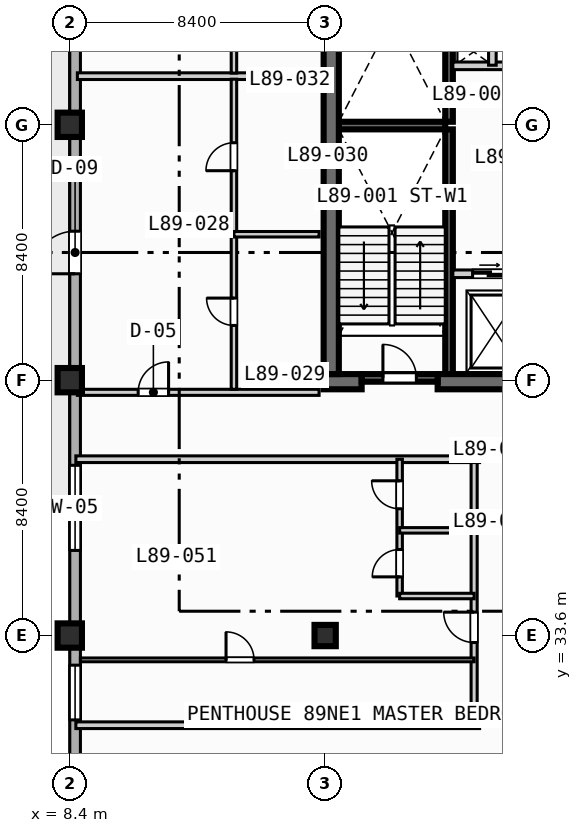
"""IFC4 building model, lengths in metres.
Left out: names, types, materials, properties, quantities, classifications, styles, units other than length and angle.
Written with IfcOpenShell. Run it as: python <this file> out.ifc"""

import sys

from ifc_helpers import new_model, si_unit, direction, frame, frame_2d, origin, origin_2d, place, context, subcontext, project, spatial, rectangle, extrude, element, fill, save


model = new_model("IFC4")
c1 = context("Model", 3, precision=1e-05, world=origin(), true_north=direction((0.0, 1.0)))
c2 = subcontext(c1, "Body", "Model", "MODEL_VIEW")
j1 = project(units=[si_unit("LENGTHUNIT", "METRE"), si_unit("PLANEANGLEUNIT", "RADIAN")], contexts=[c1])
p1 = place(None, origin())
s1 = spatial("IfcSite", under=j1, at=p1, CompositionType="ELEMENT")
p2 = place(p1, origin())
s2 = spatial("IfcBuilding", under=s1, at=p2, CompositionType="ELEMENT")
p3 = place(p2, frame((0.0, 0.0, 359.6)))
s3 = spatial("IfcBuildingStorey", under=s2, at=p3, CompositionType="ELEMENT", Elevation=359.6)
for number, where, z_axis, x_axis in (
    (1, (20.875, 42.2, 0.0), (0.0, 0.0, 1.0), (0.0, 1.0, 0.0)),
    (2, (20.875, 50.5, 0.0), (0.0, 0.0, 1.0), (0.0, 1.0, 0.0)),
):
    element("IfcWall", number, at=place(p3, frame(where, z_axis=z_axis, x_axis=x_axis)), inside=s3, PredefinedType="SOLIDWALL", context=c2, shape_type="SweptSolid", body=[
        extrude(rectangle(XDim=8.05, YDim=0.25, at=frame_2d((4.025, 0.0))), origin(), (0.0, 0.0, 1.0), 3.9),
    ])
p4 = place(p3, frame((17.25, 50.375, 0.0), z_axis=(0.0, 0.0, 1.0), x_axis=(1.0, 0.0, 0.0)))
e3 = element("IfcWall", 3, at=p4, inside=s3, PredefinedType="SOLIDWALL", context=c2, shape_type="SweptSolid", body=[
    extrude(rectangle(XDim=3.5, YDim=0.25, at=frame_2d((1.75, 0.0))), origin(), (0.0, 0.0, 1.0), 3.9),
])
p5 = place(p3, frame((16.75, 41.95, 0.0), z_axis=(0.0, 0.0, 1.0), x_axis=(1.0, 0.0, 0.0)))
e4 = element("IfcWall", 4, at=p5, inside=s3, PredefinedType="SHEAR", context=c2, shape_type="SweptSolid", body=[
    extrude(rectangle(XDim=1.25, YDim=0.5, at=frame_2d((0.625, 0.0))), origin(), (0.0, 0.0, 1.0), 3.9),
])
p6 = place(p3, frame((20.5, 41.95, 0.0), z_axis=(0.0, 0.0, 1.0), x_axis=(1.0, 0.0, 0.0)))
e5 = element("IfcWall", 5, at=p6, inside=s3, PredefinedType="SHEAR", context=c2, shape_type="SweptSolid", body=[
    extrude(rectangle(XDim=4.95, YDim=0.5, at=frame_2d((2.475, 0.0))), origin(), (0.0, 0.0, 1.0), 3.9),
])
p7 = place(p3, frame((17.0, 42.2, 0.0), z_axis=(0.0, 0.0, 1.0), x_axis=(0.0, 1.0, 0.0)))
e6 = element("IfcWall", 6, at=p7, inside=s3, PredefinedType="SHEAR", context=c2, shape_type="SweptSolid", body=[
    extrude(rectangle(XDim=16.35, YDim=0.5, at=frame_2d((8.175, 0.0))), origin(), (0.0, 0.0, 1.0), 3.9),
])
for number, where, z_axis, x_axis in (
    (7, (8.4, 33.6, 0.0), (0.0, 0.0, 1.0), (1.0, 0.0, 0.0)),
    (8, (8.4, 42.0, 0.0), (0.0, 0.0, 1.0), (1.0, 0.0, 0.0)),
    (9, (8.4, 50.4, 0.0), (0.0, 0.0, 1.0), (1.0, 0.0, 0.0)),
):
    element("IfcColumn", number, at=place(p3, frame(where, z_axis=z_axis, x_axis=x_axis)), inside=s3, PredefinedType="COLUMN", context=c2, shape_type="SweptSolid", body=[
        extrude(rectangle(XDim=0.8, YDim=0.8, at=origin_2d()), origin(), (0.0, 0.0, 1.0), 4.2),
    ])
p8 = place(p3, frame((16.8, 33.6, 0.0), z_axis=(0.0, 0.0, 1.0), x_axis=(1.0, 0.0, 0.0)))
e10 = element("IfcColumn", 10, at=p8, inside=s3, PredefinedType="COLUMN", context=c2, shape_type="SweptSolid", body=[
    extrude(rectangle(XDim=0.7, YDim=0.7, at=origin_2d()), origin(), (0.0, 0.0, 1.0), 4.2),
])
p9 = place(p3, frame((8.575, 11.575, 0.0), z_axis=(0.0, 0.0, 1.0), x_axis=(0.0, 1.0, 0.0)))
e11 = element("IfcWall", 11, at=p9, inside=s3, PredefinedType="STANDARD", context=c2, shape_type="SweptSolid", body=[
    extrude(rectangle(XDim=60.85, YDim=0.35, at=frame_2d((30.425, 0.0))), origin(), (0.0, 0.0, 1.0), 3.9),
])
p10 = place(p9, frame((33.925, 0.0, 0.0)))
e12 = element("IfcOpeningElement", 12, at=p10, cuts=e11, PredefinedType="OPENING", context=c2, shape_type="SweptSolid", body=[
    extrude(rectangle(XDim=1.4, YDim=2.2, at=frame_2d((0.7, 1.1))), frame((0.0, 0.185, 0.0), z_axis=(0.0, -1.0, 0.0), x_axis=(1.0, 0.0, 0.0)), (0.0, 0.0, 1.0), 0.37),
])
p11 = place(p9, frame((24.825, 0.0, 0.85)))
e13 = element("IfcOpeningElement", 13, at=p11, cuts=e11, PredefinedType="OPENING", context=c2, shape_type="SweptSolid", body=[
    extrude(rectangle(XDim=2.8, YDim=2.1, at=frame_2d((1.4, 1.05))), frame((0.0, 0.185, 0.0), z_axis=(0.0, -1.0, 0.0), x_axis=(1.0, 0.0, 0.0)), (0.0, 0.0, 1.0), 0.37),
])
p12 = place(p9, frame((41.625, 0.0, 0.85)))
e14 = element("IfcOpeningElement", 14, at=p12, cuts=e11, PredefinedType="OPENING", context=c2, shape_type="SweptSolid", body=[
    extrude(rectangle(XDim=2.8, YDim=2.1, at=frame_2d((1.4, 1.05))), frame((0.0, 0.185, 0.0), z_axis=(0.0, -1.0, 0.0), x_axis=(1.0, 0.0, 0.0)), (0.0, 0.0, 1.0), 0.37),
])
p13 = place(p9, frame((19.25, 0.0, 0.85)))
e15 = element("IfcOpeningElement", 15, at=p13, cuts=e11, PredefinedType="OPENING", context=c2, shape_type="SweptSolid", body=[
    extrude(rectangle(XDim=1.8, YDim=1.8, at=frame_2d((0.9, 0.9))), frame((0.0, 0.185, 0.0), z_axis=(0.0, -1.0, 0.0), x_axis=(1.0, 0.0, 0.0)), (0.0, 0.0, 1.0), 0.37),
])
p14 = place(p3, frame((18.0, 42.075, 0.0), z_axis=(0.0, 0.0, 1.0), x_axis=(1.0, 0.0, 0.0)))
e16 = element("IfcWall", 16, at=p14, inside=s3, PredefinedType="SOLIDWALL", context=c2, shape_type="SweptSolid", body=[
    extrude(rectangle(XDim=2.5, YDim=0.25, at=frame_2d((1.25, 0.0))), origin(), (0.0, 0.0, 1.0), 3.9),
])
p15 = place(p14, frame((0.7, 0.0, 0.0)))
e17 = element("IfcOpeningElement", 17, at=p15, cuts=e16, PredefinedType="OPENING", context=c2, shape_type="SweptSolid", body=[
    extrude(rectangle(XDim=1.1, YDim=2.15, at=frame_2d((0.55, 1.075))), frame((0.0, 0.135, 0.0), z_axis=(0.0, -1.0, 0.0), x_axis=(1.0, 0.0, 0.0)), (0.0, 0.0, 1.0), 0.27),
])
p16 = place(p3, frame((21.0, 45.5, 0.0), z_axis=(0.0, 0.0, 1.0), x_axis=(1.0, 0.0, 0.0)))
e18 = element("IfcWall", 18, at=p16, inside=s3, PredefinedType="SOLIDWALL", context=c2, shape_type="SweptSolid", body=[
    extrude(rectangle(XDim=4.15, YDim=0.25, at=frame_2d((2.075, 0.0))), origin(), (0.0, 0.0, 1.0), 3.9),
])
p17 = place(p16, frame((0.65, 0.0, 0.0)))
e19 = element("IfcOpeningElement", 19, at=p17, cuts=e18, PredefinedType="OPENING", context=c2, shape_type="SweptSolid", body=[
    extrude(rectangle(XDim=1.1, YDim=2.15, at=frame_2d((0.55, 1.075))), frame((0.0, 0.135, 0.0), z_axis=(0.0, -1.0, 0.0), x_axis=(1.0, 0.0, 0.0)), (0.0, 0.0, 1.0), 0.27),
])
p18 = place(p3, frame((21.0, 52.34, 0.0), z_axis=(0.0, 0.0, 1.0), x_axis=(1.0, 0.0, 0.0)))
e20 = element("IfcWall", 20, at=p18, inside=s3, PredefinedType="SOLIDWALL", context=c2, shape_type="SweptSolid", body=[
    extrude(rectangle(XDim=3.95, YDim=0.25, at=frame_2d((1.975, 0.0))), origin(), (0.0, 0.0, 1.0), 3.9),
])
p19 = place(p3, frame((22.3, 52.36, 0.0), z_axis=(0.0, 0.0, 1.0), x_axis=(0.0, 1.0, 0.0)))
e21 = element("IfcWall", 21, at=p19, inside=s3, PredefinedType="SOLIDWALL", context=c2, shape_type="SweptSolid", body=[
    extrude(rectangle(XDim=0.84, YDim=0.25, at=frame_2d((0.42, 0.0))), origin(), (0.0, 0.0, 1.0), 3.9),
])
p20 = place(p3, frame((8.65, 41.6, 0.0), z_axis=(0.0, 0.0, 1.0), x_axis=(1.0, 0.0, 0.0)))
e22 = element("IfcWall", 22, at=p20, inside=s3, PredefinedType="PARTITIONING", context=c2, shape_type="SweptSolid", body=[
    extrude(rectangle(XDim=7.95, YDim=0.2, at=frame_2d((3.975, 0.0))), origin(), (0.0, 0.0, 1.0), 3.9),
])
p21 = place(p20, frame((2.0, 0.0, 0.0)))
e23 = element("IfcOpeningElement", 23, at=p21, cuts=e22, PredefinedType="OPENING", context=c2, shape_type="SweptSolid", body=[
    extrude(rectangle(XDim=1.0, YDim=2.15, at=frame_2d((0.5, 1.075))), frame((0.0, 0.11, 0.0), z_axis=(0.0, -1.0, 0.0), x_axis=(1.0, 0.0, 0.0)), (0.0, 0.0, 1.0), 0.22),
])
p22 = place(p3, frame((8.65, 52.0, 0.0), z_axis=(0.0, 0.0, 1.0), x_axis=(1.0, 0.0, 0.0)))
e24 = element("IfcWall", 24, at=p22, inside=s3, PredefinedType="PARTITIONING", context=c2, shape_type="SweptSolid", body=[
    extrude(rectangle(XDim=7.95, YDim=0.22, at=frame_2d((3.975, 0.0))), origin(), (0.0, 0.0, 1.0), 3.9),
])
p23 = place(p3, frame((13.8, 41.7, 0.0), z_axis=(0.0, 0.0, 1.0), x_axis=(0.0, 1.0, 0.0)))
e25 = element("IfcWall", 25, at=p23, inside=s3, PredefinedType="PLUMBINGWALL", context=c2, shape_type="SweptSolid", body=[
    extrude(rectangle(XDim=10.2, YDim=0.18, at=frame_2d((5.1, 0.0))), origin(), (0.0, 0.0, 1.0), 3.9),
])
p24 = place(p23, frame((2.1, 0.0, 0.0)))
e26 = element("IfcOpeningElement", 26, at=p24, cuts=e25, PredefinedType="OPENING", context=c2, shape_type="SweptSolid", body=[
    extrude(rectangle(XDim=0.9, YDim=2.1, at=frame_2d((0.45, 1.05))), frame((0.0, 0.1, 0.0), z_axis=(0.0, -1.0, 0.0), x_axis=(1.0, 0.0, 0.0)), (0.0, 0.0, 1.0), 0.2),
])
p25 = place(p23, frame((7.19, 0.0, 0.0)))
e27 = element("IfcOpeningElement", 27, at=p25, cuts=e25, PredefinedType="OPENING", context=c2, shape_type="SweptSolid", body=[
    extrude(rectangle(XDim=0.92, YDim=2.1, at=frame_2d((0.46, 1.05))), frame((0.0, 0.1, 0.0), z_axis=(0.0, -1.0, 0.0), x_axis=(1.0, 0.0, 0.0)), (0.0, 0.0, 1.0), 0.2),
])
p26 = place(p3, frame((13.8, 46.8, 0.0), z_axis=(0.0, 0.0, 1.0), x_axis=(1.0, 0.0, 0.0)))
e28 = element("IfcWall", 28, at=p26, inside=s3, PredefinedType="PLUMBINGWALL", context=c2, shape_type="SweptSolid", body=[
    extrude(rectangle(XDim=2.8, YDim=0.18, at=frame_2d((1.4, 0.0))), origin(), (0.0, 0.0, 1.0), 3.9),
])
p27 = place(p3, frame((13.8, 52.1, 0.0), z_axis=(0.0, 0.0, 1.0), x_axis=(0.0, 1.0, 0.0)))
e29 = element("IfcWall", 29, at=p27, inside=s3, PredefinedType="PLUMBINGWALL", context=c2, shape_type="SweptSolid", body=[
    extrude(rectangle(XDim=6.8, YDim=0.18, at=frame_2d((3.4, 0.0))), origin(), (0.0, 0.0, 1.0), 3.9),
])
p28 = place(p27, frame((1.25, 0.0, 0.0)))
e30 = element("IfcOpeningElement", 30, at=p28, cuts=e29, PredefinedType="OPENING", context=c2, shape_type="SweptSolid", body=[
    extrude(rectangle(XDim=0.9, YDim=2.1, at=frame_2d((0.45, 1.05))), frame((0.0, 0.1, 0.0), z_axis=(0.0, -1.0, 0.0), x_axis=(1.0, 0.0, 0.0)), (0.0, 0.0, 1.0), 0.2),
])
p29 = place(p27, frame((4.64, 0.0, 0.0)))
e31 = element("IfcOpeningElement", 31, at=p29, cuts=e29, PredefinedType="OPENING", context=c2, shape_type="SweptSolid", body=[
    extrude(rectangle(XDim=0.92, YDim=2.1, at=frame_2d((0.46, 1.05))), frame((0.0, 0.1, 0.0), z_axis=(0.0, -1.0, 0.0), x_axis=(1.0, 0.0, 0.0)), (0.0, 0.0, 1.0), 0.2),
])
p30 = place(p3, frame((21.7, 30.65, 0.0), z_axis=(0.0, 0.0, 1.0), x_axis=(0.0, 1.0, 0.0)))
e32 = element("IfcWall", 32, at=p30, inside=s3, PredefinedType="PARTITIONING", context=c2, shape_type="SweptSolid", body=[
    extrude(rectangle(XDim=8.75, YDim=0.2, at=frame_2d((4.375, 0.0))), origin(), (0.0, 0.0, 1.0), 3.9),
])
p31 = place(p30, frame((2.72, 0.0, 0.0)))
e33 = element("IfcOpeningElement", 33, at=p31, cuts=e32, PredefinedType="OPENING", context=c2, shape_type="SweptSolid", body=[
    extrude(rectangle(XDim=1.0, YDim=2.15, at=frame_2d((0.5, 1.075))), frame((0.0, 0.11, 0.0), z_axis=(0.0, -1.0, 0.0), x_axis=(1.0, 0.0, 0.0)), (0.0, 0.0, 1.0), 0.22),
])
for number, where, z_axis, x_axis in (
    (34, (8.6, 30.65, 0.0), (0.0, 0.0, 1.0), (1.0, 0.0, 0.0)),
    (35, (8.6, 39.4, 0.0), (0.0, 0.0, 1.0), (1.0, 0.0, 0.0)),
):
    element("IfcWall", number, at=place(p3, frame(where, z_axis=z_axis, x_axis=x_axis)), inside=s3, PredefinedType="PARTITIONING", context=c2, shape_type="SweptSolid", body=[
        extrude(rectangle(XDim=13.28, YDim=0.22, at=frame_2d((6.64, 0.0))), origin(), (0.0, 0.0, 1.0), 3.9),
    ])
p32 = place(p3, frame((19.25, 34.9, 0.0), z_axis=(0.0, 0.0, 1.0), x_axis=(0.0, 1.0, 0.0)))
e36 = element("IfcWall", 36, at=p32, inside=s3, PredefinedType="PLUMBINGWALL", context=c2, shape_type="SweptSolid", body=[
    extrude(rectangle(XDim=4.5, YDim=0.18, at=frame_2d((2.25, 0.0))), origin(), (0.0, 0.0, 1.0), 3.9),
])
p33 = place(p32, frame((0.63, 0.0, 0.0)))
e37 = element("IfcOpeningElement", 37, at=p33, cuts=e36, PredefinedType="OPENING", context=c2, shape_type="SweptSolid", body=[
    extrude(rectangle(XDim=0.9, YDim=2.1, at=frame_2d((0.45, 1.05))), frame((0.0, 0.1, 0.0), z_axis=(0.0, -1.0, 0.0), x_axis=(1.0, 0.0, 0.0)), (0.0, 0.0, 1.0), 0.2),
])
p34 = place(p32, frame((2.87, 0.0, 0.0)))
e38 = element("IfcOpeningElement", 38, at=p34, cuts=e36, PredefinedType="OPENING", context=c2, shape_type="SweptSolid", body=[
    extrude(rectangle(XDim=0.92, YDim=2.1, at=frame_2d((0.46, 1.05))), frame((0.0, 0.1, 0.0), z_axis=(0.0, -1.0, 0.0), x_axis=(1.0, 0.0, 0.0)), (0.0, 0.0, 1.0), 0.2),
])
for number, where, z_axis, x_axis in (
    (39, (19.25, 34.9, 0.0), (0.0, 0.0, 1.0), (1.0, 0.0, 0.0)),
    (40, (19.25, 37.06, 0.0), (0.0, 0.0, 1.0), (1.0, 0.0, 0.0)),
):
    element("IfcWall", number, at=place(p3, frame(where, z_axis=z_axis, x_axis=x_axis)), inside=s3, PredefinedType="PLUMBINGWALL", context=c2, shape_type="SweptSolid", body=[
        extrude(rectangle(XDim=2.45, YDim=0.18, at=frame_2d((1.225, 0.0))), origin(), (0.0, 0.0, 1.0), 3.9),
    ])
p35 = place(p3, frame((8.75, 32.8, 0.0), z_axis=(0.0, 0.0, 1.0), x_axis=(1.0, 0.0, 0.0)))
e41 = element("IfcWall", 41, at=p35, inside=s3, PredefinedType="PARTITIONING", context=c2, shape_type="SweptSolid", body=[
    extrude(rectangle(XDim=12.95, YDim=0.125, at=frame_2d((6.475, 0.0))), origin(), (0.0, 0.0, 1.0), 3.9),
])
p36 = place(p35, frame((4.79, 0.0, 0.0)))
e42 = element("IfcOpeningElement", 42, at=p36, cuts=e41, PredefinedType="OPENING", context=c2, shape_type="SweptSolid", body=[
    extrude(rectangle(XDim=0.92, YDim=2.1, at=frame_2d((0.46, 1.05))), frame((0.0, 0.073, 0.0), z_axis=(0.0, -1.0, 0.0), x_axis=(1.0, 0.0, 0.0)), (0.0, 0.0, 1.0), 0.145),
])
p37 = place(p10, origin())
e43 = element("IfcDoor", 43, at=p37, inside=s3, OperationType="SINGLE_SWING_LEFT", PredefinedType="DOOR", context=c2, shape_type="SweptSolid", body=[
    extrude(rectangle(XDim=1.4, YDim=2.2, at=frame_2d((0.7, 1.1))), frame((0.0, 0.025, 0.0), z_axis=(0.0, -1.0, 0.0), x_axis=(1.0, 0.0, 0.0)), (0.0, 0.0, 1.0), 0.05),
])
fill(e12, e43)
p38 = place(p11, origin())
e44 = element("IfcWindow", 44, at=p38, inside=s3, PartitioningType="SINGLE_PANEL", PredefinedType="WINDOW", context=c2, shape_type="SweptSolid", body=[
    extrude(rectangle(XDim=2.8, YDim=2.1, at=frame_2d((1.4, 1.05))), frame((0.0, 0.03, 0.0), z_axis=(0.0, -1.0, 0.0), x_axis=(1.0, 0.0, 0.0)), (0.0, 0.0, 1.0), 0.06),
])
fill(e13, e44)
p39 = place(p13, origin())
e45 = element("IfcWindow", 45, at=p39, inside=s3, PartitioningType="SINGLE_PANEL", PredefinedType="WINDOW", context=c2, shape_type="SweptSolid", body=[
    extrude(rectangle(XDim=1.8, YDim=1.8, at=frame_2d((0.9, 0.9))), frame((0.0, 0.03, 0.0), z_axis=(0.0, -1.0, 0.0), x_axis=(1.0, 0.0, 0.0)), (0.0, 0.0, 1.0), 0.06),
])
fill(e15, e45)
p40 = place(p15, origin())
e46 = element("IfcDoor", 46, at=p40, inside=s3, OperationType="SINGLE_SWING_LEFT", PredefinedType="DOOR", context=c2, shape_type="SweptSolid", body=[
    extrude(rectangle(XDim=1.1, YDim=2.15, at=frame_2d((0.55, 1.075))), frame((0.0, 0.025, 0.0), z_axis=(0.0, -1.0, 0.0), x_axis=(1.0, 0.0, 0.0)), (0.0, 0.0, 1.0), 0.05),
])
fill(e17, e46)
p41 = place(p17, origin())
e47 = element("IfcDoor", 47, at=p41, inside=s3, OperationType="SLIDING_TO_LEFT", PredefinedType="DOOR", context=c2, shape_type="SweptSolid", body=[
    extrude(rectangle(XDim=1.1, YDim=2.15, at=frame_2d((0.55, 1.075))), frame((0.0, 0.025, 0.0), z_axis=(0.0, -1.0, 0.0), x_axis=(1.0, 0.0, 0.0)), (0.0, 0.0, 1.0), 0.05),
])
fill(e19, e47)
p42 = place(p21, origin())
e48 = element("IfcDoor", 48, at=p42, inside=s3, OperationType="SINGLE_SWING_RIGHT", PredefinedType="DOOR", context=c2, shape_type="SweptSolid", body=[
    extrude(rectangle(XDim=1.0, YDim=2.15, at=frame_2d((0.5, 1.075))), frame((0.0, 0.025, 0.0), z_axis=(0.0, -1.0, 0.0), x_axis=(1.0, 0.0, 0.0)), (0.0, 0.0, 1.0), 0.05),
])
fill(e23, e48)
p43 = place(p24, origin())
e49 = element("IfcDoor", 49, at=p43, inside=s3, OperationType="SINGLE_SWING_RIGHT", PredefinedType="DOOR", context=c2, shape_type="SweptSolid", body=[
    extrude(rectangle(XDim=0.9, YDim=2.1, at=frame_2d((0.45, 1.05))), frame((0.0, 0.025, 0.0), z_axis=(0.0, -1.0, 0.0), x_axis=(1.0, 0.0, 0.0)), (0.0, 0.0, 1.0), 0.05),
])
fill(e26, e49)
p44 = place(p25, origin())
e50 = element("IfcDoor", 50, at=p44, inside=s3, OperationType="SINGLE_SWING_LEFT", PredefinedType="DOOR", context=c2, shape_type="SweptSolid", body=[
    extrude(rectangle(XDim=0.92, YDim=2.1, at=frame_2d((0.46, 1.05))), frame((0.0, 0.025, 0.0), z_axis=(0.0, -1.0, 0.0), x_axis=(1.0, 0.0, 0.0)), (0.0, 0.0, 1.0), 0.05),
])
fill(e27, e50)
p45 = place(p31, origin())
e51 = element("IfcDoor", 51, at=p45, inside=s3, OperationType="SINGLE_SWING_RIGHT", PredefinedType="DOOR", context=c2, shape_type="SweptSolid", body=[
    extrude(rectangle(XDim=1.0, YDim=2.15, at=frame_2d((0.5, 1.075))), frame((0.0, 0.025, 0.0), z_axis=(0.0, -1.0, 0.0), x_axis=(1.0, 0.0, 0.0)), (0.0, 0.0, 1.0), 0.05),
])
fill(e33, e51)
p46 = place(p33, origin())
e52 = element("IfcDoor", 52, at=p46, inside=s3, OperationType="SINGLE_SWING_LEFT", PredefinedType="DOOR", context=c2, shape_type="SweptSolid", body=[
    extrude(rectangle(XDim=0.9, YDim=2.1, at=frame_2d((0.45, 1.05))), frame((0.0, 0.025, 0.0), z_axis=(0.0, -1.0, 0.0), x_axis=(1.0, 0.0, 0.0)), (0.0, 0.0, 1.0), 0.05),
])
fill(e37, e52)
p47 = place(p34, origin())
e53 = element("IfcDoor", 53, at=p47, inside=s3, OperationType="SINGLE_SWING_RIGHT", PredefinedType="DOOR", context=c2, shape_type="SweptSolid", body=[
    extrude(rectangle(XDim=0.92, YDim=2.1, at=frame_2d((0.46, 1.05))), frame((0.0, 0.025, 0.0), z_axis=(0.0, -1.0, 0.0), x_axis=(1.0, 0.0, 0.0)), (0.0, 0.0, 1.0), 0.05),
])
fill(e38, e53)
p48 = place(p36, origin())
e54 = element("IfcDoor", 54, at=p48, inside=s3, OperationType="SINGLE_SWING_LEFT", PredefinedType="DOOR", context=c2, shape_type="SweptSolid", body=[
    extrude(rectangle(XDim=0.92, YDim=2.1, at=frame_2d((0.46, 1.05))), frame((0.0, 0.025, 0.0), z_axis=(0.0, -1.0, 0.0), x_axis=(1.0, 0.0, 0.0)), (0.0, 0.0, 1.0), 0.05),
])
fill(e42, e54)
save(model, sys.argv[1])
